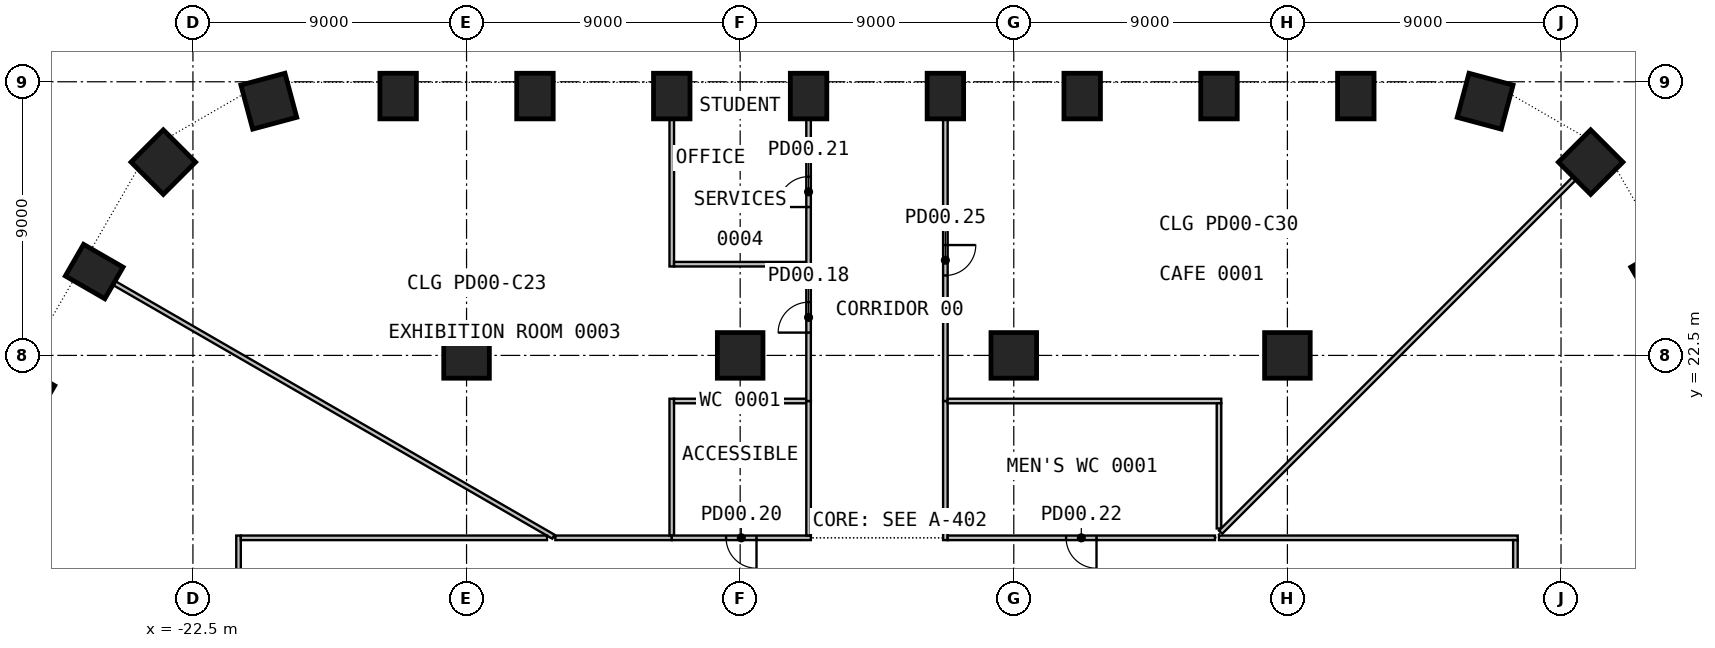
"""IFC4 building model, lengths in metres.
Left out: names, types, materials, properties, quantities, classifications, styles, units other than length and angle.
Written with IfcOpenShell. Run it as: python <this file> out.ifc"""

import sys

from ifc_helpers import new_model, si_unit, direction, frame, frame_2d, origin, origin_2d, place, context, subcontext, project, spatial, rectangle, circle, extrude, element, fill, save


model = new_model("IFC4")
c1 = context("Model", 3, precision=1e-05, world=origin(), true_north=direction((0.0, 1.0)))
c2 = subcontext(c1, "Body", "Model", "MODEL_VIEW")
j1 = project(units=[si_unit("LENGTHUNIT", "METRE"), si_unit("PLANEANGLEUNIT", "RADIAN")], contexts=[c1])
p1 = place(None, origin())
s1 = spatial("IfcSite", under=j1, at=p1, CompositionType="ELEMENT")
p2 = place(p1, origin())
s2 = spatial("IfcBuilding", under=s1, at=p2, CompositionType="ELEMENT")
p3 = place(p2, origin())
s3 = spatial("IfcBuildingStorey", under=s2, at=p3, CompositionType="ELEMENT", Elevation=0.0)
p4 = place(p3, frame((25.748, 25.258, 0.0), z_axis=(0.0, 0.0, 1.0), x_axis=(-0.5, 0.866025403784, 0.0)))
e1 = element("IfcColumn", 1, at=p4, inside=s3, PredefinedType="COLUMN", context=c2, shape_type="SweptSolid", body=[
    extrude(rectangle(XDim=1.2, YDim=1.5, at=origin_2d()), origin(), (0.0, 0.0, 1.0), 5.6),
])
for number, where, z_axis, x_axis in (
    (2, (23.475, 28.857, 0.0), (0.0, 0.0, 1.0), (-0.707, 0.707, 0.0)),
    (3, (20.004, 30.861, 0.0), (0.0, 0.0, 1.0), (-0.966, 0.259, 0.0)),
):
    element("IfcColumn", number, at=place(p3, frame(where, z_axis=z_axis, x_axis=x_axis)), inside=s3, PredefinedType="COLUMN", context=c2, shape_type="SweptSolid", body=[
        extrude(rectangle(XDim=1.5, YDim=1.5, at=origin_2d()), origin(), (0.0, 0.0, 1.0), 5.6),
    ])
for number, where, z_axis, x_axis in (
    (4, (15.75, 31.03, 0.0), (0.0, 0.0, 1.0), (-1.0, 0.0, 0.0)),
    (5, (11.25, 31.03, 0.0), (0.0, 0.0, 1.0), (-1.0, 0.0, 0.0)),
    (6, (6.75, 31.03, 0.0), (0.0, 0.0, 1.0), (-1.0, 0.0, 0.0)),
    (7, (2.25, 31.03, 0.0), (0.0, 0.0, 1.0), (-1.0, 0.0, 0.0)),
    (8, (-2.25, 31.03, 0.0), (0.0, 0.0, 1.0), (-1.0, 0.0, 0.0)),
    (9, (-6.75, 31.03, 0.0), (0.0, 0.0, 1.0), (-1.0, 0.0, 0.0)),
    (10, (-11.25, 31.03, 0.0), (0.0, 0.0, 1.0), (-1.0, 0.0, 0.0)),
    (11, (-15.75, 31.03, 0.0), (0.0, 0.0, 1.0), (-1.0, 0.0, 0.0)),
):
    element("IfcColumn", number, at=place(p3, frame(where, z_axis=z_axis, x_axis=x_axis)), inside=s3, PredefinedType="COLUMN", context=c2, shape_type="SweptSolid", body=[
        extrude(rectangle(XDim=1.2, YDim=1.5, at=origin_2d()), origin(), (0.0, 0.0, 1.0), 5.6),
    ])
for number, where, z_axis, x_axis in (
    (12, (-20.004, 30.861, 0.0), (0.0, 0.0, 1.0), (-0.966, -0.259, 0.0)),
    (13, (-23.475, 28.857, 0.0), (0.0, 0.0, 1.0), (-0.707, -0.707, 0.0)),
):
    element("IfcColumn", number, at=place(p3, frame(where, z_axis=z_axis, x_axis=x_axis)), inside=s3, PredefinedType="COLUMN", context=c2, shape_type="SweptSolid", body=[
        extrude(rectangle(XDim=1.5, YDim=1.5, at=origin_2d()), origin(), (0.0, 0.0, 1.0), 5.6),
    ])
for number, where, z_axis, x_axis in (
    (14, (-25.748, 25.258, 0.0), (0.0, 0.0, 1.0), (-0.5, -0.866, 0.0)),
    (15, (-27.998, 21.361, 0.0), (0.0, 0.0, 1.0), (-0.5, -0.866, 0.0)),
):
    element("IfcColumn", number, at=place(p3, frame(where, z_axis=z_axis, x_axis=x_axis)), inside=s3, PredefinedType="COLUMN", context=c2, shape_type="SweptSolid", body=[
        extrude(rectangle(XDim=1.2, YDim=1.5, at=origin_2d()), origin(), (0.0, 0.0, 1.0), 5.6),
    ])
for number, where, z_axis, x_axis in (
    (16, (-13.5, 22.5, 0.0), (0.0, 0.0, 1.0), (1.0, 0.0, 0.0)),
    (17, (-4.5, 22.5, 0.0), (0.0, 0.0, 1.0), (1.0, 0.0, 0.0)),
    (18, (4.5, 22.5, 0.0), (0.0, 0.0, 1.0), (1.0, 0.0, 0.0)),
    (19, (13.5, 22.5, 0.0), (0.0, 0.0, 1.0), (1.0, 0.0, 0.0)),
):
    element("IfcColumn", number, at=place(p3, frame(where, z_axis=z_axis, x_axis=x_axis)), inside=s3, PredefinedType="COLUMN", context=c2, shape_type="SweptSolid", body=[
        extrude(circle(Radius=0.75, at=origin_2d()), origin(), (0.0, 0.0, 1.0), 5.6),
    ])
p5 = place(p3, frame((-25.081, 24.873, 0.0), z_axis=(0.0, 0.0, 1.0), x_axis=(0.866011934562, -0.500023328652, 0.0)))
e20 = element("IfcWall", 20, at=p5, inside=s3, PredefinedType="PARTITIONING", context=c2, shape_type="SweptSolid", body=[
    extrude(rectangle(XDim=16.67, YDim=0.15, at=frame_2d((8.335, 0.0))), origin(), (0.0, 0.0, 1.0), 5.6),
])
p6 = place(p3, frame((-21.0, 16.575, 0.0), z_axis=(0.0, 0.0, 1.0), x_axis=(0.0, -1.0, 0.0)))
e21 = element("IfcWall", 21, at=p6, inside=s3, PredefinedType="PARTITIONING", context=c2, shape_type="SweptSolid", body=[
    extrude(rectangle(XDim=14.25, YDim=0.15, at=frame_2d((7.125, 0.0))), origin(), (0.0, 0.0, 1.0), 5.6),
])
p7 = place(p6, frame((6.625, 0.0, 0.0)))
e22 = element("IfcOpeningElement", 22, at=p7, cuts=e21, PredefinedType="OPENING", context=c2, shape_type="SweptSolid", body=[
    extrude(rectangle(XDim=1.0, YDim=2.1, at=frame_2d((0.5, 1.05))), frame((0.0, 0.085, 0.0), z_axis=(0.0, -1.0, 0.0), x_axis=(1.0, 0.0, 0.0)), (0.0, 0.0, 1.0), 0.17),
])
p8 = place(p3, frame((-10.854, 16.5, 0.0), z_axis=(0.0, 0.0, 1.0), x_axis=(-1.0, 0.0, 0.0)))
e23 = element("IfcWall", 23, at=p8, inside=s3, PredefinedType="PARTITIONING", context=c2, shape_type="SweptSolid", body=[
    extrude(rectangle(XDim=10.071, YDim=0.15, at=frame_2d((5.036, 0.0))), origin(), (0.0, 0.0, 1.0), 5.6),
])
p9 = place(p3, frame((-6.75, 16.5, 0.0), z_axis=(0.0, 0.0, 1.0), x_axis=(-1.0, 0.0, 0.0)))
e24 = element("IfcWall", 24, at=p9, inside=s3, PredefinedType="PARTITIONING", context=c2, shape_type="SweptSolid", body=[
    extrude(rectangle(XDim=3.829, YDim=0.15, at=frame_2d((1.915, 0.0))), origin(), (0.0, 0.0, 1.0), 5.6),
])
p10 = place(p3, frame((-6.75, 21.075, 0.0), z_axis=(0.0, 0.0, 1.0), x_axis=(0.0, -1.0, 0.0)))
e25 = element("IfcWall", 25, at=p10, inside=s3, PredefinedType="PARTITIONING", context=c2, shape_type="SweptSolid", body=[
    extrude(rectangle(XDim=4.5, YDim=0.15, at=frame_2d((2.25, 0.0))), origin(), (0.0, 0.0, 1.0), 5.6),
])
p11 = place(p3, frame((-2.175, 16.5, 0.0), z_axis=(0.0, 0.0, 1.0), x_axis=(-1.0, 0.0, 0.0)))
e26 = element("IfcWall", 26, at=p11, inside=s3, PredefinedType="PARTITIONING", context=c2, shape_type="SweptSolid", body=[
    extrude(rectangle(XDim=4.575, YDim=0.15, at=frame_2d((2.288, 0.0))), origin(), (0.0, 0.0, 1.0), 5.6),
])
p12 = place(p11, frame((1.788, 0.0, 0.0)))
e27 = element("IfcOpeningElement", 27, at=p12, cuts=e26, PredefinedType="OPENING", context=c2, shape_type="SweptSolid", body=[
    extrude(rectangle(XDim=1.0, YDim=2.1, at=frame_2d((0.5, 1.05))), frame((0.0, 0.085, 0.0), z_axis=(0.0, -1.0, 0.0), x_axis=(1.0, 0.0, 0.0)), (0.0, 0.0, 1.0), 0.17),
])
p13 = place(p3, frame((-2.325, 21.0, 0.0), z_axis=(0.0, 0.0, 1.0), x_axis=(-1.0, 0.0, 0.0)))
e28 = element("IfcWall", 28, at=p13, inside=s3, PredefinedType="PARTITIONING", context=c2, shape_type="SweptSolid", body=[
    extrude(rectangle(XDim=4.35, YDim=0.15, at=frame_2d((2.175, 0.0))), origin(), (0.0, 0.0, 1.0), 5.6),
])
p14 = place(p3, frame((-6.75, 30.26, 0.0), z_axis=(0.0, 0.0, 1.0), x_axis=(0.0, -1.0, 0.0)))
e29 = element("IfcWall", 29, at=p14, inside=s3, PredefinedType="PARTITIONING", context=c2, shape_type="SweptSolid", body=[
    extrude(rectangle(XDim=4.835, YDim=0.15, at=frame_2d((2.417, 0.0))), origin(), (0.0, 0.0, 1.0), 5.6),
])
p15 = place(p3, frame((-6.675, 25.5, 0.0), z_axis=(0.0, 0.0, 1.0), x_axis=(1.0, 0.0, 0.0)))
e30 = element("IfcWall", 30, at=p15, inside=s3, PredefinedType="PARTITIONING", context=c2, shape_type="SweptSolid", body=[
    extrude(rectangle(XDim=4.35, YDim=0.15, at=frame_2d((2.175, 0.0))), origin(), (0.0, 0.0, 1.0), 5.6),
])
p16 = place(p3, frame((-2.25, 16.575, 0.0), z_axis=(0.0, 0.0, 1.0), x_axis=(0.0, 1.0, 0.0)))
e31 = element("IfcWall", 31, at=p16, inside=s3, PredefinedType="PARTITIONING", context=c2, shape_type="SweptSolid", body=[
    extrude(rectangle(XDim=4.425, YDim=0.15, at=frame_2d((2.212, 0.0))), origin(), (0.0, 0.0, 1.0), 5.6),
])
p17 = place(p3, frame((-2.25, 21.0, 0.0), z_axis=(0.0, 0.0, 1.0), x_axis=(0.0, 1.0, 0.0)))
e32 = element("IfcWall", 32, at=p17, inside=s3, PredefinedType="PARTITIONING", context=c2, shape_type="SweptSolid", body=[
    extrude(rectangle(XDim=4.5, YDim=0.15, at=frame_2d((2.25, 0.0))), origin(), (0.0, 0.0, 1.0), 5.6),
])
p18 = place(p17, frame((2.25, 0.0, 0.0)))
e33 = element("IfcOpeningElement", 33, at=p18, cuts=e32, PredefinedType="OPENING", context=c2, shape_type="SweptSolid", body=[
    extrude(rectangle(XDim=1.0, YDim=2.1, at=frame_2d((0.5, 1.05))), frame((0.0, 0.085, 0.0), z_axis=(0.0, -1.0, 0.0), x_axis=(1.0, 0.0, 0.0)), (0.0, 0.0, 1.0), 0.17),
])
p19 = place(p3, frame((-2.25, 25.5, 0.0), z_axis=(0.0, 0.0, 1.0), x_axis=(0.0, 1.0, 0.0)))
e34 = element("IfcWall", 34, at=p19, inside=s3, PredefinedType="PARTITIONING", context=c2, shape_type="SweptSolid", body=[
    extrude(rectangle(XDim=4.76, YDim=0.15, at=frame_2d((2.38, 0.0))), origin(), (0.0, 0.0, 1.0), 5.6),
])
p20 = place(p19, frame((1.88, 0.0, 0.0)))
e35 = element("IfcOpeningElement", 35, at=p20, cuts=e34, PredefinedType="OPENING", context=c2, shape_type="SweptSolid", body=[
    extrude(rectangle(XDim=1.0, YDim=2.1, at=frame_2d((0.5, 1.05))), frame((0.0, 0.085, 0.0), z_axis=(0.0, -1.0, 0.0), x_axis=(1.0, 0.0, 0.0)), (0.0, 0.0, 1.0), 0.17),
])
p21 = place(p3, frame((2.25, 21.0, 0.0), z_axis=(0.0, 0.0, 1.0), x_axis=(0.0, -1.0, 0.0)))
e36 = element("IfcWall", 36, at=p21, inside=s3, PredefinedType="PARTITIONING", context=c2, shape_type="SweptSolid", body=[
    extrude(rectangle(XDim=4.575, YDim=0.15, at=frame_2d((2.288, 0.0))), origin(), (0.0, 0.0, 1.0), 5.6),
])
p22 = place(p3, frame((11.117, 16.5, 0.0), z_axis=(0.0, 0.0, 1.0), x_axis=(-1.0, 0.0, 0.0)))
e37 = element("IfcWall", 37, at=p22, inside=s3, PredefinedType="PARTITIONING", context=c2, shape_type="SweptSolid", body=[
    extrude(rectangle(XDim=8.792, YDim=0.15, at=frame_2d((4.396, 0.0))), origin(), (0.0, 0.0, 1.0), 5.6),
])
p23 = place(p22, frame((3.896, 0.0, 0.0)))
e38 = element("IfcOpeningElement", 38, at=p23, cuts=e37, PredefinedType="OPENING", context=c2, shape_type="SweptSolid", body=[
    extrude(rectangle(XDim=1.0, YDim=2.1, at=frame_2d((0.5, 1.05))), frame((0.0, 0.085, 0.0), z_axis=(0.0, -1.0, 0.0), x_axis=(1.0, 0.0, 0.0)), (0.0, 0.0, 1.0), 0.17),
])
p24 = place(p3, frame((2.25, 30.26, 0.0), z_axis=(0.0, 0.0, 1.0), x_axis=(0.0, -1.0, 0.0)))
e39 = element("IfcWall", 39, at=p24, inside=s3, PredefinedType="PARTITIONING", context=c2, shape_type="SweptSolid", body=[
    extrude(rectangle(XDim=9.26, YDim=0.15, at=frame_2d((4.63, 0.0))), origin(), (0.0, 0.0, 1.0), 5.6),
])
p25 = place(p24, frame((4.13, 0.0, 0.0)))
e40 = element("IfcOpeningElement", 40, at=p25, cuts=e39, PredefinedType="OPENING", context=c2, shape_type="SweptSolid", body=[
    extrude(rectangle(XDim=1.0, YDim=2.1, at=frame_2d((0.5, 1.05))), frame((0.0, 0.085, 0.0), z_axis=(0.0, -1.0, 0.0), x_axis=(1.0, 0.0, 0.0)), (0.0, 0.0, 1.0), 0.17),
])
p26 = place(p3, frame((2.325, 21.0, 0.0), z_axis=(0.0, 0.0, 1.0), x_axis=(1.0, 0.0, 0.0)))
e41 = element("IfcWall", 41, at=p26, inside=s3, PredefinedType="PARTITIONING", context=c2, shape_type="SweptSolid", body=[
    extrude(rectangle(XDim=9.0, YDim=0.15, at=frame_2d((4.5, 0.0))), origin(), (0.0, 0.0, 1.0), 5.6),
])
p27 = place(p3, frame((21.075, 16.5, 0.0), z_axis=(0.0, 0.0, 1.0), x_axis=(-1.0, 0.0, 0.0)))
e42 = element("IfcWall", 42, at=p27, inside=s3, PredefinedType="PARTITIONING", context=c2, shape_type="SweptSolid", body=[
    extrude(rectangle(XDim=9.825, YDim=0.15, at=frame_2d((4.913, 0.0))), origin(), (0.0, 0.0, 1.0), 5.6),
])
p28 = place(p3, frame((11.25, 20.925, 0.0), z_axis=(0.0, 0.0, 1.0), x_axis=(0.0, -1.0, 0.0)))
e43 = element("IfcWall", 43, at=p28, inside=s3, PredefinedType="PARTITIONING", context=c2, shape_type="SweptSolid", body=[
    extrude(rectangle(XDim=4.117, YDim=0.15, at=frame_2d((2.059, 0.0))), origin(), (0.0, 0.0, 1.0), 5.6),
])
p29 = place(p3, frame((22.93, 28.313, 0.0), z_axis=(0.0, 0.0, 1.0), x_axis=(-0.707114204919, -0.707099357376, 0.0)))
e44 = element("IfcWall", 44, at=p29, inside=s3, PredefinedType="PARTITIONING", context=c2, shape_type="SweptSolid", body=[
    extrude(rectangle(XDim=16.443, YDim=0.15, at=frame_2d((8.222, 0.0))), origin(), (0.0, 0.0, 1.0), 5.6),
])
p30 = place(p3, frame((21.0, 2.175, 0.0), z_axis=(0.0, 0.0, 1.0), x_axis=(0.0, 1.0, 0.0)))
e45 = element("IfcWall", 45, at=p30, inside=s3, PredefinedType="PARTITIONING", context=c2, shape_type="SweptSolid", body=[
    extrude(rectangle(XDim=14.25, YDim=0.15, at=frame_2d((7.125, 0.0))), origin(), (0.0, 0.0, 1.0), 5.6),
])
p31 = place(p30, frame((6.625, 0.0, 0.0)))
e46 = element("IfcOpeningElement", 46, at=p31, cuts=e45, PredefinedType="OPENING", context=c2, shape_type="SweptSolid", body=[
    extrude(rectangle(XDim=1.0, YDim=2.1, at=frame_2d((0.5, 1.05))), frame((0.0, 0.085, 0.0), z_axis=(0.0, -1.0, 0.0), x_axis=(1.0, 0.0, 0.0)), (0.0, 0.0, 1.0), 0.17),
])
p32 = place(p18, origin())
e47 = element("IfcDoor", 47, at=p32, inside=s3, OperationType="SINGLE_SWING_LEFT", PredefinedType="DOOR", context=c2, shape_type="SweptSolid", body=[
    extrude(rectangle(XDim=1.0, YDim=2.1, at=frame_2d((0.5, 1.05))), frame((0.0, 0.025, 0.0), z_axis=(0.0, -1.0, 0.0), x_axis=(1.0, 0.0, 0.0)), (0.0, 0.0, 1.0), 0.05),
])
fill(e33, e47)
p33 = place(p12, origin())
e48 = element("IfcDoor", 48, at=p33, inside=s3, OperationType="SINGLE_SWING_RIGHT", PredefinedType="DOOR", context=c2, shape_type="SweptSolid", body=[
    extrude(rectangle(XDim=1.0, YDim=2.1, at=frame_2d((0.5, 1.05))), frame((0.0, 0.025, 0.0), z_axis=(0.0, -1.0, 0.0), x_axis=(1.0, 0.0, 0.0)), (0.0, 0.0, 1.0), 0.05),
])
fill(e27, e48)
p34 = place(p20, origin())
e49 = element("IfcDoor", 49, at=p34, inside=s3, OperationType="SINGLE_SWING_LEFT", PredefinedType="DOOR", context=c2, shape_type="SweptSolid", body=[
    extrude(rectangle(XDim=1.0, YDim=2.1, at=frame_2d((0.5, 1.05))), frame((0.0, 0.025, 0.0), z_axis=(0.0, -1.0, 0.0), x_axis=(1.0, 0.0, 0.0)), (0.0, 0.0, 1.0), 0.05),
])
fill(e35, e49)
p35 = place(p23, origin())
e50 = element("IfcDoor", 50, at=p35, inside=s3, OperationType="SINGLE_SWING_RIGHT", PredefinedType="DOOR", context=c2, shape_type="SweptSolid", body=[
    extrude(rectangle(XDim=1.0, YDim=2.1, at=frame_2d((0.5, 1.05))), frame((0.0, 0.025, 0.0), z_axis=(0.0, -1.0, 0.0), x_axis=(1.0, 0.0, 0.0)), (0.0, 0.0, 1.0), 0.05),
])
fill(e38, e50)
p36 = place(p25, origin())
e51 = element("IfcDoor", 51, at=p36, inside=s3, OperationType="SINGLE_SWING_RIGHT", PredefinedType="DOOR", context=c2, shape_type="SweptSolid", body=[
    extrude(rectangle(XDim=1.0, YDim=2.1, at=frame_2d((0.5, 1.05))), frame((0.0, 0.025, 0.0), z_axis=(0.0, -1.0, 0.0), x_axis=(1.0, 0.0, 0.0)), (0.0, 0.0, 1.0), 0.05),
])
fill(e40, e51)
save(model, sys.argv[1])
